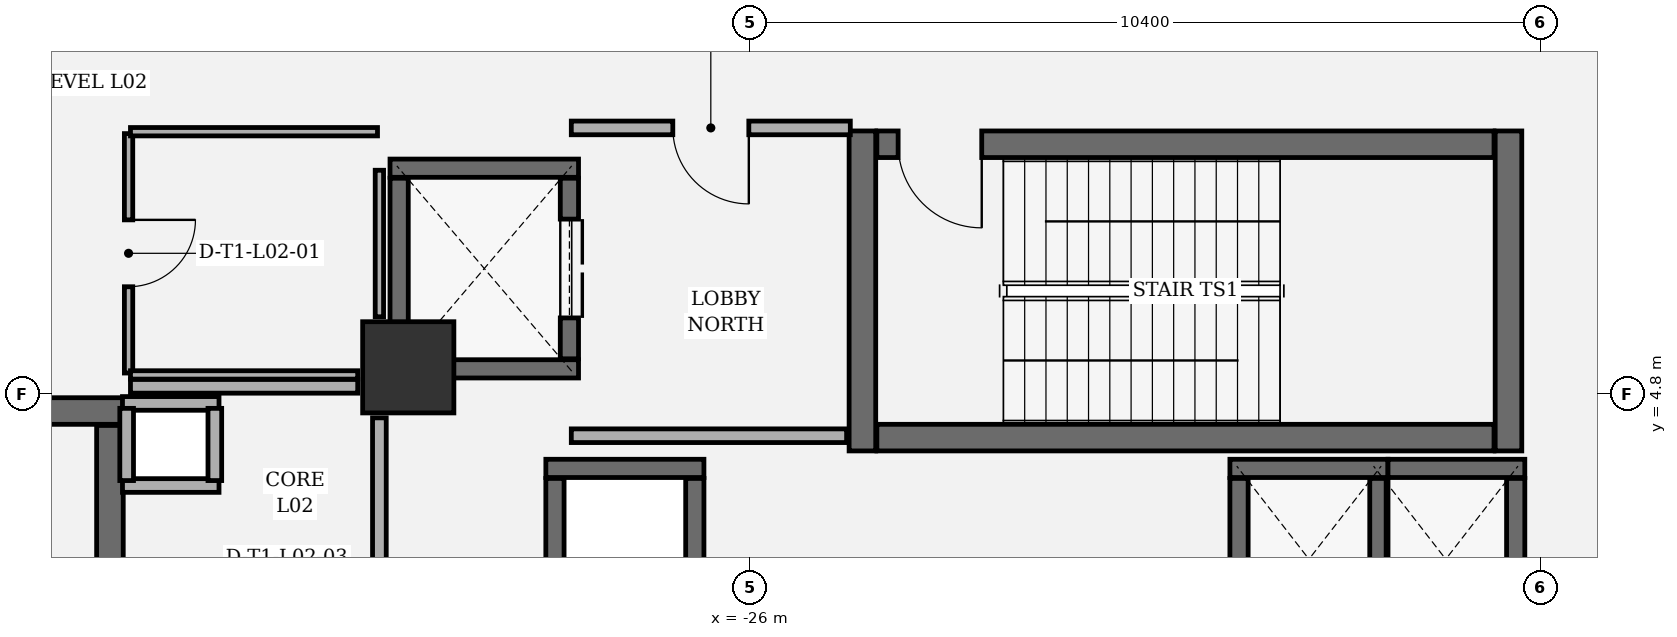
"""IFC4 building model, lengths in metres.
Left out: names, types, materials, properties, quantities, classifications, styles, units other than length and angle.
Written with IfcOpenShell. Run it as: python <this file> out.ifc"""

import sys

from ifc_helpers import new_model, si_unit, direction, frame, frame_2d, origin, origin_2d, place, context, subcontext, project, spatial, rectangle, extrude, element, fill, save


model = new_model("IFC4")
c1 = context("Model", 3, precision=1e-05, world=origin(), true_north=direction((0.0, 1.0)))
c2 = subcontext(c1, "Body", "Model", "MODEL_VIEW")
j1 = project(units=[si_unit("LENGTHUNIT", "METRE"), si_unit("PLANEANGLEUNIT", "RADIAN")], contexts=[c1])
p1 = place(None, origin())
s1 = spatial("IfcSite", under=j1, at=p1, CompositionType="ELEMENT")
p2 = place(p1, origin())
s2 = spatial("IfcBuilding", under=s1, at=p2, CompositionType="ELEMENT")
p3 = place(p2, frame((0.0, 0.0, 12.0)))
s3 = spatial("IfcBuildingStorey", under=s2, at=p3, CompositionType="ELEMENT", Elevation=12.0)
p4 = place(p3, frame((-30.5, 5.15, 0.0), z_axis=(0.0, 0.0, 1.0), x_axis=(1.0, 0.0, 0.0)))
e1 = element("IfcColumn", 1, at=p4, inside=s3, PredefinedType="COLUMN", context=c2, shape_type="SweptSolid", body=[
    extrude(rectangle(XDim=1.2, YDim=1.2, at=origin_2d()), origin(), (0.0, 0.0, 1.0), 5.0),
])
p5 = place(p3, frame((-64.419, 4.637, 0.0), z_axis=(0.0, 0.0, 1.0), x_axis=(0.842602364841, 0.538536214905, 0.0)))
e2 = element("IfcWall", 2, at=p5, inside=s3, PredefinedType="SOLIDWALL", context=c2, shape_type="SweptSolid", body=[
    extrude(rectangle(XDim=60.27, YDim=0.38, at=frame_2d((30.135, 0.0))), origin(), (0.0, 0.0, 1.0), 4.74),
])
p6 = place(p5, frame((29.435, 0.0, 0.8)))
e3 = element("IfcOpeningElement", 3, at=p6, cuts=e2, PredefinedType="OPENING", context=c2, shape_type="SweptSolid", body=[
    extrude(rectangle(XDim=1.4, YDim=1.5, at=frame_2d((0.7, 0.75))), frame((0.0, 0.2, 0.0), z_axis=(0.0, -1.0, 0.0), x_axis=(1.0, 0.0, 0.0)), (0.0, 0.0, 1.0), 0.4),
])
for number, where, z_axis, x_axis in (
    (4, (-24.525, 8.26, 0.0), (0.0, 0.0, 1.0), (0.0, -1.0, 0.0)),
    (5, (-16.025, 4.05, 0.0), (0.0, 0.0, 1.0), (0.0, 1.0, 0.0)),
):
    element("IfcWall", number, at=place(p3, frame(where, z_axis=z_axis, x_axis=x_axis)), inside=s3, PredefinedType="SHEAR", context=c2, shape_type="SweptSolid", body=[
        extrude(rectangle(XDim=4.21, YDim=0.35, at=frame_2d((2.105, 0.0))), origin(), (0.0, 0.0, 1.0), 4.74),
    ])
p7 = place(p3, frame((-24.335, 4.225, 0.0), z_axis=(0.0, 0.0, 1.0), x_axis=(1.0, 0.0, 0.0)))
e6 = element("IfcWall", 6, at=p7, inside=s3, PredefinedType="SHEAR", context=c2, shape_type="SweptSolid", body=[
    extrude(rectangle(XDim=8.12, YDim=0.35, at=frame_2d((4.06, 0.0))), origin(), (0.0, 0.0, 1.0), 4.74),
])
p8 = place(p3, frame((-16.215, 8.085, 0.0), z_axis=(0.0, 0.0, 1.0), x_axis=(-1.0, 0.0, 0.0)))
e7 = element("IfcWall", 7, at=p8, inside=s3, PredefinedType="SHEAR", context=c2, shape_type="SweptSolid", body=[
    extrude(rectangle(XDim=8.12, YDim=0.35, at=frame_2d((4.06, 0.0))), origin(), (0.0, 0.0, 1.0), 4.74),
])
p9 = place(p8, frame((6.74, 0.0, 0.0)))
e8 = element("IfcOpeningElement", 8, at=p9, cuts=e7, PredefinedType="OPENING", context=c2, shape_type="SweptSolid", body=[
    extrude(rectangle(XDim=1.1, YDim=2.2, at=frame_2d((0.55, 1.1))), frame((0.0, 0.185, 0.0), z_axis=(0.0, -1.0, 0.0), x_axis=(1.0, 0.0, 0.0)), (0.0, 0.0, 1.0), 0.37),
])
p10 = place(p3, frame((-34.25, 4.575, 0.0), z_axis=(0.0, 0.0, 1.0), x_axis=(-1.0, 0.0, 0.0)))
e9 = element("IfcWall", 9, at=p10, inside=s3, PredefinedType="SHEAR", context=c2, shape_type="SweptSolid", body=[
    extrude(rectangle(XDim=4.21, YDim=0.35, at=frame_2d((2.105, 0.0))), origin(), (0.0, 0.0, 1.0), 4.74),
])
p11 = place(p3, frame((-34.425, -4.385, 0.0), z_axis=(0.0, 0.0, 1.0), x_axis=(0.0, 1.0, 0.0)))
e10 = element("IfcWall", 10, at=p11, inside=s3, PredefinedType="SHEAR", context=c2, shape_type="SweptSolid", body=[
    extrude(rectangle(XDim=8.77, YDim=0.35, at=frame_2d((4.385, 0.0))), origin(), (0.0, 0.0, 1.0), 4.74),
])
for number, where, z_axis, x_axis in (
    (11, (-28.26, 5.13, 0.0), (0.0, 0.0, 1.0), (-1.0, 0.0, 0.0)),
    (12, (-30.74, 7.77, 0.0), (0.0, 0.0, 1.0), (1.0, 0.0, 0.0)),
):
    element("IfcWall", number, at=place(p3, frame(where, z_axis=z_axis, x_axis=x_axis)), inside=s3, PredefinedType="SHEAR", context=c2, shape_type="SweptSolid", body=[
        extrude(rectangle(XDim=2.48, YDim=0.24, at=frame_2d((1.24, 0.0))), origin(), (0.0, 0.0, 1.0), 4.74),
    ])
p12 = place(p3, frame((-30.62, 5.262, 0.0), z_axis=(0.0, 0.0, 1.0), x_axis=(0.0, 1.0, 0.0)))
e13 = element("IfcWall", 13, at=p12, inside=s3, PredefinedType="SHEAR", context=c2, shape_type="SweptSolid", body=[
    extrude(rectangle(XDim=2.376, YDim=0.24, at=frame_2d((1.188, 0.0))), origin(), (0.0, 0.0, 1.0), 4.74),
])
p13 = place(p3, frame((-28.38, 7.638, 0.0), z_axis=(0.0, 0.0, 1.0), x_axis=(0.0, -1.0, 0.0)))
e14 = element("IfcWall", 14, at=p13, inside=s3, PredefinedType="SHEAR", context=c2, shape_type="SweptSolid", body=[
    extrude(rectangle(XDim=2.376, YDim=0.24, at=frame_2d((1.188, 0.0))), origin(), (0.0, 0.0, 1.0), 4.74),
])
p14 = place(p13, frame((0.538, 0.0, 0.0)))
e15 = element("IfcOpeningElement", 15, at=p14, cuts=e14, PredefinedType="OPENING", context=c2, shape_type="SweptSolid", body=[
    extrude(rectangle(XDim=1.3, YDim=2.3, at=frame_2d((0.65, 1.15))), frame((0.0, 0.13, 0.0), z_axis=(0.0, -1.0, 0.0), x_axis=(1.0, 0.0, 0.0)), (0.0, 0.0, 1.0), 0.26),
])
p15 = place(p3, frame((-28.69, 3.82, 0.0), z_axis=(0.0, 0.0, 1.0), x_axis=(1.0, 0.0, 0.0)))
e16 = element("IfcWall", 16, at=p15, inside=s3, PredefinedType="SHEAR", context=c2, shape_type="SweptSolid", body=[
    extrude(rectangle(XDim=2.08, YDim=0.24, at=frame_2d((1.04, 0.0))), origin(), (0.0, 0.0, 1.0), 4.74),
])
for number, where, z_axis, x_axis in (
    (17, (-28.57, 1.562, 0.0), (0.0, 0.0, 1.0), (0.0, 1.0, 0.0)),
    (18, (-26.73, 3.688, 0.0), (0.0, 0.0, 1.0), (0.0, -1.0, 0.0)),
):
    element("IfcWall", number, at=place(p3, frame(where, z_axis=z_axis, x_axis=x_axis)), inside=s3, PredefinedType="SHEAR", context=c2, shape_type="SweptSolid", body=[
        extrude(rectangle(XDim=2.126, YDim=0.24, at=frame_2d((1.063, 0.0))), origin(), (0.0, 0.0, 1.0), 4.74),
    ])
p16 = place(p3, frame((-19.69, 3.82, 0.0), z_axis=(0.0, 0.0, 1.0), x_axis=(1.0, 0.0, 0.0)))
e19 = element("IfcWall", 19, at=p16, inside=s3, PredefinedType="SHEAR", context=c2, shape_type="SweptSolid", body=[
    extrude(rectangle(XDim=2.08, YDim=0.24, at=frame_2d((1.04, 0.0))), origin(), (0.0, 0.0, 1.0), 4.74),
])
for number, where, z_axis, x_axis in (
    (20, (-19.57, 1.562, 0.0), (0.0, 0.0, 1.0), (0.0, 1.0, 0.0)),
    (21, (-17.73, 3.688, 0.0), (0.0, 0.0, 1.0), (0.0, -1.0, 0.0)),
):
    element("IfcWall", number, at=place(p3, frame(where, z_axis=z_axis, x_axis=x_axis)), inside=s3, PredefinedType="SHEAR", context=c2, shape_type="SweptSolid", body=[
        extrude(rectangle(XDim=2.126, YDim=0.24, at=frame_2d((1.063, 0.0))), origin(), (0.0, 0.0, 1.0), 4.74),
    ])
p17 = place(p3, frame((-17.61, 3.82, 0.0), z_axis=(0.0, 0.0, 1.0), x_axis=(1.0, 0.0, 0.0)))
e22 = element("IfcWall", 22, at=p17, inside=s3, PredefinedType="SHEAR", context=c2, shape_type="SweptSolid", body=[
    extrude(rectangle(XDim=1.8, YDim=0.24, at=frame_2d((0.9, 0.0))), origin(), (0.0, 0.0, 1.0), 4.74),
])
p18 = place(p3, frame((-15.93, 3.688, 0.0), z_axis=(0.0, 0.0, 1.0), x_axis=(0.0, -1.0, 0.0)))
e23 = element("IfcWall", 23, at=p18, inside=s3, PredefinedType="SHEAR", context=c2, shape_type="SweptSolid", body=[
    extrude(rectangle(XDim=2.126, YDim=0.24, at=frame_2d((1.063, 0.0))), origin(), (0.0, 0.0, 1.0), 4.74),
])
for number, where, z_axis, x_axis in (
    (24, (-32.99, 3.595, 0.0), (0.0, 0.0, 1.0), (-1.0, 0.0, 0.0)),
    (25, (-34.26, 4.675, 0.0), (0.0, 0.0, 1.0), (1.0, 0.0, 0.0)),
):
    element("IfcWall", number, at=place(p3, frame(where, z_axis=z_axis, x_axis=x_axis)), inside=s3, PredefinedType="PARTITIONING", context=c2, shape_type="SweptSolid", body=[
        extrude(rectangle(XDim=1.27, YDim=0.18, at=frame_2d((0.635, 0.0))), origin(), (0.0, 0.0, 1.0), 4.74),
    ])
for number, where, z_axis, x_axis in (
    (26, (-34.205, 3.66, 0.0), (0.0, 0.0, 1.0), (0.0, 1.0, 0.0)),
    (27, (-33.045, 4.61, 0.0), (0.0, 0.0, 1.0), (0.0, -1.0, 0.0)),
):
    element("IfcWall", number, at=place(p3, frame(where, z_axis=z_axis, x_axis=x_axis)), inside=s3, PredefinedType="PARTITIONING", context=c2, shape_type="SweptSolid", body=[
        extrude(rectangle(XDim=0.95, YDim=0.18, at=frame_2d((0.475, 0.0))), origin(), (0.0, 0.0, 1.0), 4.74),
    ])
p19 = place(p3, frame((-28.355, 4.25, 0.0), z_axis=(0.0, 0.0, 1.0), x_axis=(1.0, 0.0, 0.0)))
e28 = element("IfcWall", 28, at=p19, inside=s3, PredefinedType="PARTITIONING", context=c2, shape_type="SweptSolid", body=[
    extrude(rectangle(XDim=3.622, YDim=0.18, at=frame_2d((1.811, 0.0))), origin(), (0.0, 0.0, 1.0), 4.74),
])
p20 = place(p3, frame((-24.684, 8.3, 0.0), z_axis=(0.0, 0.0, 1.0), x_axis=(-1.0, 0.0, 0.0)))
e29 = element("IfcWall", 29, at=p20, inside=s3, PredefinedType="PARTITIONING", context=c2, shape_type="SweptSolid", body=[
    extrude(rectangle(XDim=3.671, YDim=0.18, at=frame_2d((1.835, 0.0))), origin(), (0.0, 0.0, 1.0), 4.253),
])
p21 = place(p20, frame((1.335, 0.0, 0.0)))
e30 = element("IfcOpeningElement", 30, at=p21, cuts=e29, PredefinedType="OPENING", context=c2, shape_type="SweptSolid", body=[
    extrude(rectangle(XDim=1.0, YDim=2.15, at=frame_2d((0.5, 1.075))), frame((0.0, 0.1, 0.0), z_axis=(0.0, -1.0, 0.0), x_axis=(1.0, 0.0, 0.0)), (0.0, 0.0, 1.0), 0.2),
])
p22 = place(p3, frame((-34.18, 8.225, 0.0), z_axis=(0.0, 0.0, 1.0), x_axis=(0.0, -1.0, 0.0)))
e31 = element("IfcWall", 31, at=p22, inside=s3, PredefinedType="PARTITIONING", context=c2, shape_type="SweptSolid", body=[
    extrude(rectangle(XDim=3.15, YDim=0.11, at=frame_2d((1.575, 0.0))), origin(), (0.0, 0.0, 1.0), 4.74),
])
p23 = place(p22, frame((1.135, 0.0, 0.0)))
e32 = element("IfcOpeningElement", 32, at=p23, cuts=e31, PredefinedType="OPENING", context=c2, shape_type="SweptSolid", body=[
    extrude(rectangle(XDim=0.88, YDim=2.1, at=frame_2d((0.44, 1.05))), frame((0.0, 0.065, 0.0), z_axis=(0.0, -1.0, 0.0), x_axis=(1.0, 0.0, 0.0)), (0.0, 0.0, 1.0), 0.13),
])
p24 = place(p3, frame((-34.155, 5.05, 0.0), z_axis=(0.0, 0.0, 1.0), x_axis=(1.0, 0.0, 0.0)))
e33 = element("IfcWall", 33, at=p24, inside=s3, PredefinedType="PARTITIONING", context=c2, shape_type="SweptSolid", body=[
    extrude(rectangle(XDim=2.99, YDim=0.11, at=frame_2d((1.495, 0.0))), origin(), (0.0, 0.0, 1.0), 4.74),
])
p25 = place(p3, frame((-30.88, 5.815, 0.0), z_axis=(0.0, 0.0, 1.0), x_axis=(0.0, 1.0, 0.0)))
e34 = element("IfcWall", 34, at=p25, inside=s3, PredefinedType="PARTITIONING", context=c2, shape_type="SweptSolid", body=[
    extrude(rectangle(XDim=1.928, YDim=0.11, at=frame_2d((0.964, 0.0))), origin(), (0.0, 0.0, 1.0), 4.74),
])
p26 = place(p3, frame((-30.905, 8.25, 0.0), z_axis=(0.0, 0.0, 1.0), x_axis=(-1.0, 0.0, 0.0)))
e35 = element("IfcWall", 35, at=p26, inside=s3, PredefinedType="PARTITIONING", context=c2, shape_type="SweptSolid", body=[
    extrude(rectangle(XDim=3.25, YDim=0.11, at=frame_2d((1.625, 0.0))), origin(), (0.0, 0.0, 1.0), 4.253),
])
p27 = place(p3, frame((-30.88, 1.625, 0.0), z_axis=(0.0, 0.0, 1.0), x_axis=(0.0, 1.0, 0.0)))
e36 = element("IfcWall", 36, at=p27, inside=s3, PredefinedType="PARTITIONING", context=c2, shape_type="SweptSolid", body=[
    extrude(rectangle(XDim=2.86, YDim=0.18, at=frame_2d((1.43, 0.0))), origin(), (0.0, 0.0, 1.0), 4.74),
])
p28 = place(p3, frame((-31.165, 4.9, 0.0), z_axis=(0.0, 0.0, 1.0), x_axis=(-1.0, 0.0, 0.0)))
e37 = element("IfcWall", 37, at=p28, inside=s3, PredefinedType="PARTITIONING", context=c2, shape_type="SweptSolid", body=[
    extrude(rectangle(XDim=2.99, YDim=0.18, at=frame_2d((1.495, 0.0))), origin(), (0.0, 0.0, 1.0), 4.74),
])
p29 = place(p9, origin())
e38 = element("IfcDoor", 38, at=p29, inside=s3, OperationType="SINGLE_SWING_LEFT", PredefinedType="DOOR", context=c2, shape_type="SweptSolid", body=[
    extrude(rectangle(XDim=1.1, YDim=2.2, at=frame_2d((0.55, 1.1))), frame((0.0, 0.025, 0.0), z_axis=(0.0, -1.0, 0.0), x_axis=(1.0, 0.0, 0.0)), (0.0, 0.0, 1.0), 0.05),
])
fill(e8, e38)
p30 = place(p14, origin())
e39 = element("IfcDoor", 39, at=p30, inside=s3, OperationType="DOUBLE_DOOR_SLIDING", PredefinedType="DOOR", context=c2, shape_type="SweptSolid", body=[
    extrude(rectangle(XDim=1.3, YDim=2.3, at=frame_2d((0.65, 1.15))), frame((0.0, 0.025, 0.0), z_axis=(0.0, -1.0, 0.0), x_axis=(1.0, 0.0, 0.0)), (0.0, 0.0, 1.0), 0.05),
])
fill(e15, e39)
p31 = place(p23, origin())
e40 = element("IfcDoor", 40, at=p31, inside=s3, OperationType="SINGLE_SWING_LEFT", PredefinedType="DOOR", context=c2, shape_type="SweptSolid", body=[
    extrude(rectangle(XDim=0.88, YDim=2.1, at=frame_2d((0.44, 1.05))), frame((0.0, 0.025, 0.0), z_axis=(0.0, -1.0, 0.0), x_axis=(1.0, 0.0, 0.0)), (0.0, 0.0, 1.0), 0.05),
])
fill(e32, e40)
p32 = place(p21, origin())
e41 = element("IfcDoor", 41, at=p32, inside=s3, OperationType="SINGLE_SWING_LEFT", PredefinedType="DOOR", context=c2, shape_type="SweptSolid", body=[
    extrude(rectangle(XDim=1.0, YDim=2.15, at=frame_2d((0.5, 1.075))), frame((0.0, 0.025, 0.0), z_axis=(0.0, -1.0, 0.0), x_axis=(1.0, 0.0, 0.0)), (0.0, 0.0, 1.0), 0.05),
])
fill(e30, e41)
save(model, sys.argv[1])
